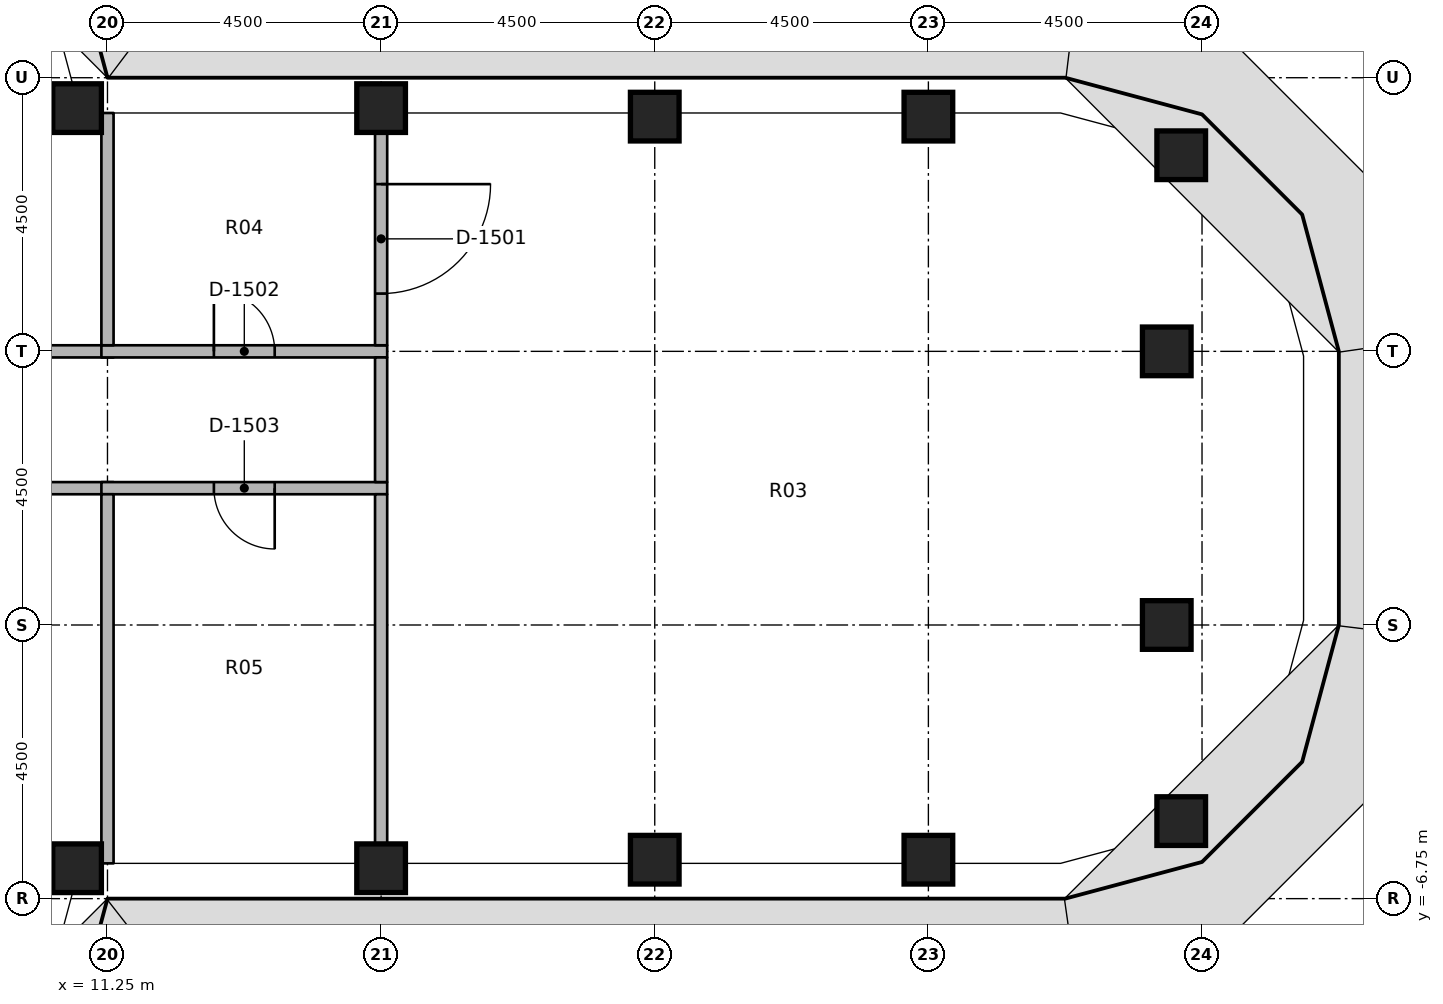
"""IFC4 building model, lengths in metres.
Left out: names, types, materials, properties, quantities, classifications, styles, units other than length and angle.
Written with IfcOpenShell. Run it as: python <this file> out.ifc"""

import sys

from ifc_helpers import new_model, si_unit, direction, frame, frame_2d, origin, origin_2d, place, context, subcontext, project, spatial, rectangle, extrude, element, fill, save


model = new_model("IFC4")
c1 = context("Model", 3, precision=1e-05, world=origin(), true_north=direction((0.0, 1.0)))
c2 = subcontext(c1, "Body", "Model", "MODEL_VIEW")
j1 = project(units=[si_unit("LENGTHUNIT", "METRE"), si_unit("PLANEANGLEUNIT", "RADIAN")], contexts=[c1])
p1 = place(None, origin())
s1 = spatial("IfcSite", under=j1, at=p1, CompositionType="ELEMENT")
p2 = place(p1, origin())
s2 = spatial("IfcBuilding", under=s1, at=p2, CompositionType="ELEMENT")
p3 = place(p2, frame((0.0, 0.0, 144.8)))
s3 = spatial("IfcBuildingStorey", under=s2, at=p3, CompositionType="ELEMENT", Elevation=144.8)
for number, where, z_axis, x_axis in (
    (1, (10.75, -6.25, 0.0), (0.0, 0.0, 1.0), (1.0, 0.0, 0.0)),
    (2, (10.75, 6.25, 0.0), (0.0, 0.0, 1.0), (1.0, 0.0, 0.0)),
    (3, (15.75, -6.25, 0.0), (0.0, 0.0, 1.0), (1.0, 0.0, 0.0)),
    (4, (15.75, 6.25, 0.0), (0.0, 0.0, 1.0), (1.0, 0.0, 0.0)),
    (5, (20.25, -6.11, 0.0), (0.0, 0.0, 1.0), (1.0, 0.0, 0.0)),
    (6, (20.25, 6.11, 0.0), (0.0, 0.0, 1.0), (1.0, 0.0, 0.0)),
    (7, (24.75, -6.11, 0.0), (0.0, 0.0, 1.0), (1.0, 0.0, 0.0)),
    (8, (24.75, 6.11, 0.0), (0.0, 0.0, 1.0), (1.0, 0.0, 0.0)),
    (9, (28.908, -5.475, 0.0), (0.0, 0.0, 1.0), (1.0, 0.0, 0.0)),
    (10, (28.67, -2.25, 0.0), (0.0, 0.0, 1.0), (1.0, 0.0, 0.0)),
    (11, (28.67, 2.25, 0.0), (0.0, 0.0, 1.0), (1.0, 0.0, 0.0)),
    (12, (28.908, 5.475, 0.0), (0.0, 0.0, 1.0), (1.0, 0.0, 0.0)),
):
    element("IfcColumn", number, at=place(p3, frame(where, z_axis=z_axis, x_axis=x_axis)), inside=s3, PredefinedType="COLUMN", context=c2, shape_type="SweptSolid", body=[
        extrude(rectangle(XDim=0.8, YDim=0.8, at=origin_2d()), origin(), (0.0, 0.0, 1.0), 3.65),
    ])
p4 = place(p3, frame((6.65, 2.25, 0.0), z_axis=(0.0, 0.0, 1.0), x_axis=(1.0, 0.0, 0.0)))
e13 = element("IfcWall", 13, at=p4, inside=s3, PredefinedType="PARTITIONING", context=c2, shape_type="SweptSolid", body=[
    extrude(rectangle(XDim=4.7, YDim=0.2, at=frame_2d((2.35, 0.0))), origin(), (0.0, 0.0, 1.0), 2.75),
])
p5 = place(p4, frame((1.85, 0.0, 0.0)))
e14 = element("IfcOpeningElement", 14, at=p5, cuts=e13, PredefinedType="OPENING", context=c2, shape_type="SweptSolid", body=[
    extrude(rectangle(XDim=1.0, YDim=2.1, at=frame_2d((0.5, 1.05))), frame((0.0, 0.11, 0.0), z_axis=(0.0, -1.0, 0.0), x_axis=(1.0, 0.0, 0.0)), (0.0, 0.0, 1.0), 0.22),
])
p6 = place(p3, frame((11.35, 0.0, 0.0), z_axis=(0.0, 0.0, 1.0), x_axis=(-1.0, 0.0, 0.0)))
e15 = element("IfcWall", 15, at=p6, inside=s3, PredefinedType="PARTITIONING", context=c2, shape_type="SweptSolid", body=[
    extrude(rectangle(XDim=4.7, YDim=0.2, at=frame_2d((2.35, 0.0))), origin(), (0.0, 0.0, 1.0), 2.75),
])
p7 = place(p6, frame((1.85, 0.0, 0.0)))
e16 = element("IfcOpeningElement", 16, at=p7, cuts=e15, PredefinedType="OPENING", context=c2, shape_type="SweptSolid", body=[
    extrude(rectangle(XDim=1.0, YDim=2.1, at=frame_2d((0.5, 1.05))), frame((0.0, 0.11, 0.0), z_axis=(0.0, -1.0, 0.0), x_axis=(1.0, 0.0, 0.0)), (0.0, 0.0, 1.0), 0.22),
])
p8 = place(p3, frame((11.15, 2.25, 0.0), z_axis=(0.0, 0.0, 1.0), x_axis=(1.0, 0.0, 0.0)))
e17 = element("IfcWall", 17, at=p8, inside=s3, PredefinedType="PARTITIONING", context=c2, shape_type="SweptSolid", body=[
    extrude(rectangle(XDim=4.7, YDim=0.2, at=frame_2d((2.35, 0.0))), origin(), (0.0, 0.0, 1.0), 2.75),
])
p9 = place(p8, frame((1.85, 0.0, 0.0)))
e18 = element("IfcOpeningElement", 18, at=p9, cuts=e17, PredefinedType="OPENING", context=c2, shape_type="SweptSolid", body=[
    extrude(rectangle(XDim=1.0, YDim=2.1, at=frame_2d((0.5, 1.05))), frame((0.0, 0.11, 0.0), z_axis=(0.0, -1.0, 0.0), x_axis=(1.0, 0.0, 0.0)), (0.0, 0.0, 1.0), 0.22),
])
p10 = place(p3, frame((15.85, 0.0, 0.0), z_axis=(0.0, 0.0, 1.0), x_axis=(-1.0, 0.0, 0.0)))
e19 = element("IfcWall", 19, at=p10, inside=s3, PredefinedType="PARTITIONING", context=c2, shape_type="SweptSolid", body=[
    extrude(rectangle(XDim=4.7, YDim=0.2, at=frame_2d((2.35, 0.0))), origin(), (0.0, 0.0, 1.0), 2.75),
])
p11 = place(p10, frame((1.85, 0.0, 0.0)))
e20 = element("IfcOpeningElement", 20, at=p11, cuts=e19, PredefinedType="OPENING", context=c2, shape_type="SweptSolid", body=[
    extrude(rectangle(XDim=1.0, YDim=2.1, at=frame_2d((0.5, 1.05))), frame((0.0, 0.11, 0.0), z_axis=(0.0, -1.0, 0.0), x_axis=(1.0, 0.0, 0.0)), (0.0, 0.0, 1.0), 0.22),
])
p12 = place(p3, frame((15.75, 0.1, 0.0), z_axis=(0.0, 0.0, 1.0), x_axis=(0.0, 1.0, 0.0)))
e21 = element("IfcWall", 21, at=p12, inside=s3, PredefinedType="PARTITIONING", context=c2, shape_type="SweptSolid", body=[
    extrude(rectangle(XDim=2.05, YDim=0.2, at=frame_2d((1.025, 0.0))), origin(), (0.0, 0.0, 1.0), 2.75),
])
p13 = place(p3, frame((11.25, 2.35, 0.0), z_axis=(0.0, 0.0, 1.0), x_axis=(0.0, 1.0, 0.0)))
e22 = element("IfcWall", 22, at=p13, inside=s3, PredefinedType="PARTITIONING", context=c2, shape_type="SweptSolid", body=[
    extrude(rectangle(XDim=3.82, YDim=0.2, at=frame_2d((1.91, 0.0))), origin(), (0.0, 0.0, 1.0), 2.75),
])
p14 = place(p3, frame((11.25, -6.17, 0.0), z_axis=(0.0, 0.0, 1.0), x_axis=(0.0, 1.0, 0.0)))
e23 = element("IfcWall", 23, at=p14, inside=s3, PredefinedType="PARTITIONING", context=c2, shape_type="SweptSolid", body=[
    extrude(rectangle(XDim=6.07, YDim=0.2, at=frame_2d((3.035, 0.0))), origin(), (0.0, 0.0, 1.0), 2.75),
])
p15 = place(p3, frame((15.75, 5.85, 0.0), z_axis=(0.0, 0.0, 1.0), x_axis=(0.0, -1.0, 0.0)))
e24 = element("IfcWall", 24, at=p15, inside=s3, PredefinedType="PARTITIONING", context=c2, shape_type="SweptSolid", body=[
    extrude(rectangle(XDim=3.5, YDim=0.2, at=frame_2d((1.75, 0.0))), origin(), (0.0, 0.0, 1.0), 2.75),
])
p16 = place(p15, frame((0.85, 0.0, 0.0)))
e25 = element("IfcOpeningElement", 25, at=p16, cuts=e24, PredefinedType="OPENING", context=c2, shape_type="SweptSolid", body=[
    extrude(rectangle(XDim=1.8, YDim=2.1, at=frame_2d((0.9, 1.05))), frame((0.0, 0.11, 0.0), z_axis=(0.0, -1.0, 0.0), x_axis=(1.0, 0.0, 0.0)), (0.0, 0.0, 1.0), 0.22),
])
p17 = place(p3, frame((15.75, -5.85, 0.0), z_axis=(0.0, 0.0, 1.0), x_axis=(0.0, 1.0, 0.0)))
e26 = element("IfcWall", 26, at=p17, inside=s3, PredefinedType="PARTITIONING", context=c2, shape_type="SweptSolid", body=[
    extrude(rectangle(XDim=5.75, YDim=0.2, at=frame_2d((2.875, 0.0))), origin(), (0.0, 0.0, 1.0), 2.75),
])
p18 = place(p16, origin())
e27 = element("IfcDoor", 27, at=p18, inside=s3, OperationType="DOUBLE_DOOR_SINGLE_SWING", PredefinedType="DOOR", context=c2, shape_type="SweptSolid", body=[
    extrude(rectangle(XDim=1.8, YDim=2.1, at=frame_2d((0.9, 1.05))), frame((0.0, 0.025, 0.0), z_axis=(0.0, -1.0, 0.0), x_axis=(1.0, 0.0, 0.0)), (0.0, 0.0, 1.0), 0.05),
])
fill(e25, e27)
p19 = place(p9, origin())
e28 = element("IfcDoor", 28, at=p19, inside=s3, OperationType="SINGLE_SWING_RIGHT", PredefinedType="DOOR", context=c2, shape_type="SweptSolid", body=[
    extrude(rectangle(XDim=1.0, YDim=2.1, at=frame_2d((0.5, 1.05))), frame((0.0, 0.025, 0.0), z_axis=(0.0, -1.0, 0.0), x_axis=(1.0, 0.0, 0.0)), (0.0, 0.0, 1.0), 0.05),
])
fill(e18, e28)
p20 = place(p11, origin())
e29 = element("IfcDoor", 29, at=p20, inside=s3, OperationType="SINGLE_SWING_RIGHT", PredefinedType="DOOR", context=c2, shape_type="SweptSolid", body=[
    extrude(rectangle(XDim=1.0, YDim=2.1, at=frame_2d((0.5, 1.05))), frame((0.0, 0.025, 0.0), z_axis=(0.0, -1.0, 0.0), x_axis=(1.0, 0.0, 0.0)), (0.0, 0.0, 1.0), 0.05),
])
fill(e20, e29)
save(model, sys.argv[1])
